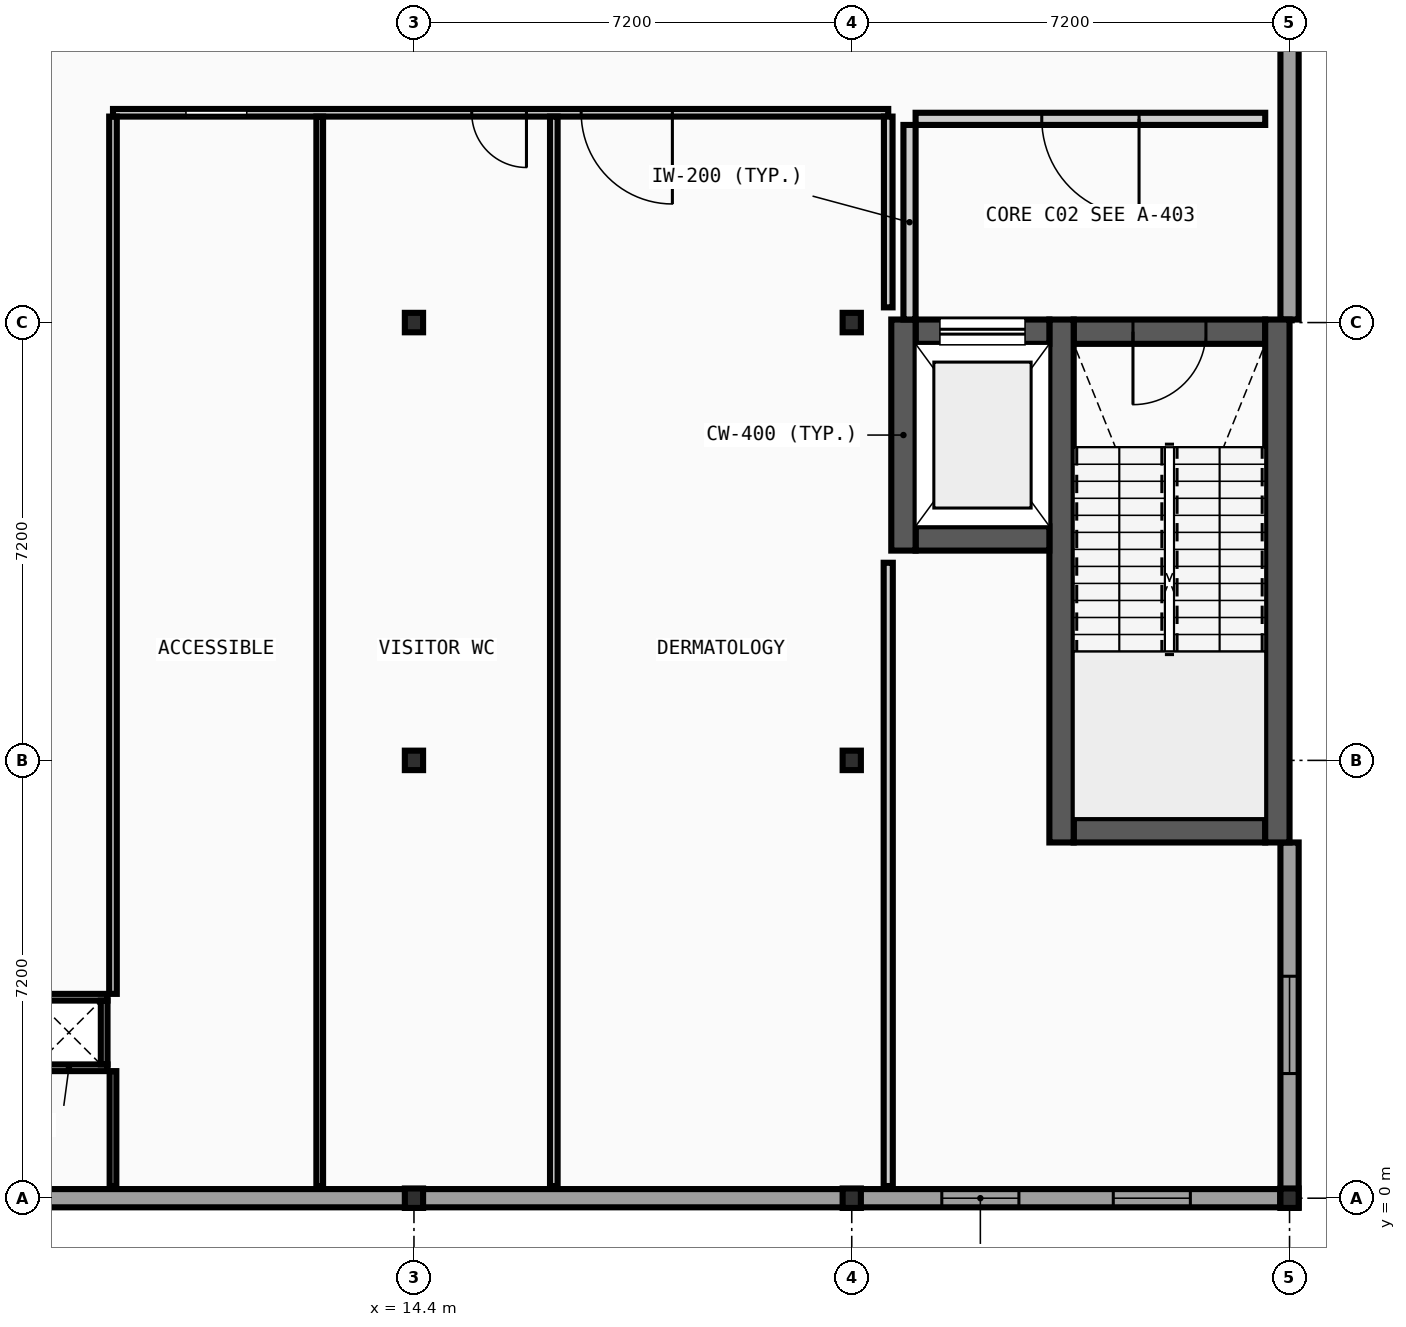
"""IFC4 building model, lengths in metres.
Left out: names, types, materials, properties, quantities, classifications, styles, units other than length and angle.
Written with IfcOpenShell. Run it as: python <this file> out.ifc"""

import sys

from ifc_helpers import new_model, si_unit, direction, frame, frame_2d, origin, origin_2d, place, context, subcontext, project, spatial, rectangle, i_section, extrude, element, fill, save


model = new_model("IFC4")
c1 = context("Model", 3, precision=1e-05, world=origin(), true_north=direction((0.0, 1.0)))
c2 = subcontext(c1, "Body", "Model", "MODEL_VIEW")
j1 = project(units=[si_unit("LENGTHUNIT", "METRE"), si_unit("PLANEANGLEUNIT", "RADIAN")], contexts=[c1])
p1 = place(None, origin())
s1 = spatial("IfcSite", under=j1, at=p1, CompositionType="ELEMENT")
p2 = place(p1, origin())
s2 = spatial("IfcBuilding", under=s1, at=p2, CompositionType="ELEMENT")
p3 = place(p2, frame((0.0, 0.0, 22.8)))
s3 = spatial("IfcBuildingStorey", under=s2, at=p3, CompositionType="ELEMENT", Elevation=22.8)
for number, where, z_axis, x_axis in (
    (1, (14.4, 0.0, 0.0), (0.0, 0.0, 1.0), (1.0, 0.0, 0.0)),
    (2, (14.4, 7.2, 0.0), (0.0, 0.0, 1.0), (1.0, 0.0, 0.0)),
    (3, (14.4, 14.4, 0.0), (0.0, 0.0, 1.0), (1.0, 0.0, 0.0)),
    (4, (21.6, 0.0, 0.0), (0.0, 0.0, 1.0), (1.0, 0.0, 0.0)),
    (5, (21.6, 7.2, 0.0), (0.0, 0.0, 1.0), (1.0, 0.0, 0.0)),
    (6, (21.6, 14.4, 0.0), (0.0, 0.0, 1.0), (1.0, 0.0, 0.0)),
    (7, (28.8, 0.0, 0.0), (0.0, 0.0, 1.0), (1.0, 0.0, 0.0)),
):
    element("IfcColumn", number, at=place(p3, frame(where, z_axis=z_axis, x_axis=x_axis)), inside=s3, PredefinedType="COLUMN", context=c2, shape_type="SweptSolid", body=[
        extrude(i_section(OverallWidth=0.3, OverallDepth=0.32, WebThickness=0.011, FlangeThickness=0.021, FilletRadius=0.027, at=origin_2d()), origin(), (0.0, 0.0, 1.0), 4.4),
    ])
p4 = place(p3, frame((7.2, 0.0, 0.0), z_axis=(0.0, 0.0, 1.0), x_axis=(1.0, 0.0, 0.0)))
e8 = element("IfcWall", 8, at=p4, inside=s3, PredefinedType="STANDARD", context=c2, shape_type="SweptSolid", body=[
    extrude(rectangle(XDim=7.2, YDim=0.3, at=frame_2d((3.6, 0.0))), origin(), (0.0, 0.0, 1.0), 3.95),
])
p5 = place(p3, frame((14.4, 0.0, 0.0), z_axis=(0.0, 0.0, 1.0), x_axis=(1.0, 0.0, 0.0)))
e9 = element("IfcWall", 9, at=p5, inside=s3, PredefinedType="STANDARD", context=c2, shape_type="SweptSolid", body=[
    extrude(rectangle(XDim=7.2, YDim=0.3, at=frame_2d((3.6, 0.0))), origin(), (0.0, 0.0, 1.0), 3.95),
])
p6 = place(p3, frame((21.6, 0.0, 0.0), z_axis=(0.0, 0.0, 1.0), x_axis=(1.0, 0.0, 0.0)))
e10 = element("IfcWall", 10, at=p6, inside=s3, PredefinedType="STANDARD", context=c2, shape_type="SweptSolid", body=[
    extrude(rectangle(XDim=7.05, YDim=0.3, at=frame_2d((3.525, 0.0))), origin(), (0.0, 0.0, 1.0), 3.95),
])
p7 = place(p6, frame((1.481, 0.0, 0.95)))
e11 = element("IfcOpeningElement", 11, at=p7, cuts=e10, PredefinedType="OPENING", context=c2, shape_type="SweptSolid", body=[
    extrude(rectangle(XDim=1.268, YDim=1.404, at=frame_2d((0.634, 0.702))), frame((0.0, 0.16, 0.0), z_axis=(0.0, -1.0, 0.0), x_axis=(1.0, 0.0, 0.0)), (0.0, 0.0, 1.0), 0.32),
])
p8 = place(p6, frame((4.301, 0.0, 0.95)))
e12 = element("IfcOpeningElement", 12, at=p8, cuts=e10, PredefinedType="OPENING", context=c2, shape_type="SweptSolid", body=[
    extrude(rectangle(XDim=1.268, YDim=1.404, at=frame_2d((0.634, 0.702))), frame((0.0, 0.16, 0.0), z_axis=(0.0, -1.0, 0.0), x_axis=(1.0, 0.0, 0.0)), (0.0, 0.0, 1.0), 0.32),
])
p9 = place(p3, frame((28.8, -0.15, 0.0), z_axis=(0.0, 0.0, 1.0), x_axis=(0.0, 1.0, 0.0)))
e13 = element("IfcWall", 13, at=p9, inside=s3, PredefinedType="STANDARD", context=c2, shape_type="SweptSolid", body=[
    extrude(rectangle(XDim=6.0, YDim=0.3, at=frame_2d((3.0, 0.0))), origin(), (0.0, 0.0, 1.0), 4.215),
])
p10 = place(p9, frame((2.2, 0.0, 1.2)))
e14 = element("IfcOpeningElement", 14, at=p10, cuts=e13, PredefinedType="OPENING", context=c2, shape_type="SweptSolid", body=[
    extrude(rectangle(XDim=1.6, YDim=1.4, at=frame_2d((0.8, 0.7))), frame((0.0, 0.16, 0.0), z_axis=(0.0, -1.0, 0.0), x_axis=(1.0, 0.0, 0.0)), (0.0, 0.0, 1.0), 0.32),
])
p11 = place(p3, frame((28.8, 14.45, 0.0), z_axis=(0.0, 0.0, 1.0), x_axis=(0.0, 1.0, 0.0)))
e15 = element("IfcWall", 15, at=p11, inside=s3, PredefinedType="STANDARD", context=c2, shape_type="SweptSolid", body=[
    extrude(rectangle(XDim=7.15, YDim=0.3, at=frame_2d((3.575, 0.0))), origin(), (0.0, 0.0, 1.0), 4.215),
])
p12 = place(p3, frame((25.25, 6.05, 0.0), z_axis=(0.0, 0.0, 1.0), x_axis=(1.0, 0.0, 0.0)))
e16 = element("IfcWall", 16, at=p12, inside=s3, PredefinedType="SHEAR", context=c2, shape_type="SweptSolid", body=[
    extrude(rectangle(XDim=3.15, YDim=0.4, at=frame_2d((1.575, 0.0))), origin(), (0.0, 0.0, 1.0), 4.215),
])
p13 = place(p3, frame((25.25, 14.25, 0.0), z_axis=(0.0, 0.0, 1.0), x_axis=(1.0, 0.0, 0.0)))
e17 = element("IfcWall", 17, at=p13, inside=s3, PredefinedType="SHEAR", context=c2, shape_type="SweptSolid", body=[
    extrude(rectangle(XDim=3.15, YDim=0.4, at=frame_2d((1.575, 0.0))), origin(), (0.0, 0.0, 1.0), 4.215),
])
p14 = place(p13, frame((0.975, 0.0, 0.0)))
e18 = element("IfcOpeningElement", 18, at=p14, cuts=e17, PredefinedType="OPENING", context=c2, shape_type="SweptSolid", body=[
    extrude(rectangle(XDim=1.2, YDim=2.15, at=frame_2d((0.6, 1.075))), frame((0.0, 0.21, 0.0), z_axis=(0.0, -1.0, 0.0), x_axis=(1.0, 0.0, 0.0)), (0.0, 0.0, 1.0), 0.42),
])
for number, where, z_axis, x_axis in (
    (19, (25.05, 5.85, 0.0), (0.0, 0.0, 1.0), (0.0, 1.0, 0.0)),
    (20, (28.6, 5.85, 0.0), (0.0, 0.0, 1.0), (0.0, 1.0, 0.0)),
):
    element("IfcWall", number, at=place(p3, frame(where, z_axis=z_axis, x_axis=x_axis)), inside=s3, PredefinedType="SHEAR", context=c2, shape_type="SweptSolid", body=[
        extrude(rectangle(XDim=8.6, YDim=0.4, at=frame_2d((4.3, 0.0))), origin(), (0.0, 0.0, 1.0), 4.215),
    ])
p15 = place(p3, frame((22.65, 10.85, 0.0), z_axis=(0.0, 0.0, 1.0), x_axis=(1.0, 0.0, 0.0)))
e21 = element("IfcWall", 21, at=p15, inside=s3, PredefinedType="SHEAR", context=c2, shape_type="SweptSolid", body=[
    extrude(rectangle(XDim=2.2, YDim=0.4, at=frame_2d((1.1, 0.0))), origin(), (0.0, 0.0, 1.0), 4.215),
])
p16 = place(p3, frame((22.65, 14.25, 0.0), z_axis=(0.0, 0.0, 1.0), x_axis=(1.0, 0.0, 0.0)))
e22 = element("IfcWall", 22, at=p16, inside=s3, PredefinedType="SHEAR", context=c2, shape_type="SweptSolid", body=[
    extrude(rectangle(XDim=2.2, YDim=0.4, at=frame_2d((1.1, 0.0))), origin(), (0.0, 0.0, 1.0), 4.215),
])
p17 = place(p16, frame((0.4, 0.0, 0.0)))
e23 = element("IfcOpeningElement", 23, at=p17, cuts=e22, PredefinedType="OPENING", context=c2, shape_type="SweptSolid", body=[
    extrude(rectangle(XDim=1.4, YDim=2.2, at=frame_2d((0.7, 1.1))), frame((0.0, 0.21, 0.0), z_axis=(0.0, -1.0, 0.0), x_axis=(1.0, 0.0, 0.0)), (0.0, 0.0, 1.0), 0.42),
])
p18 = place(p3, frame((22.45, 10.65, 0.0), z_axis=(0.0, 0.0, 1.0), x_axis=(0.0, 1.0, 0.0)))
e24 = element("IfcWall", 24, at=p18, inside=s3, PredefinedType="SHEAR", context=c2, shape_type="SweptSolid", body=[
    extrude(rectangle(XDim=3.8, YDim=0.4, at=frame_2d((1.9, 0.0))), origin(), (0.0, 0.0, 1.0), 4.215),
])
p19 = place(p3, frame((22.65, 17.75, 0.0), z_axis=(0.0, 0.0, 1.0), x_axis=(1.0, 0.0, 0.0)))
e25 = element("IfcWall", 25, at=p19, inside=s3, PredefinedType="PARTITIONING", context=c2, shape_type="SweptSolid", body=[
    extrude(rectangle(XDim=5.75, YDim=0.2, at=frame_2d((2.875, 0.0))), origin(), (0.0, 0.0, 1.0), 4.215),
])
p20 = place(p19, frame((2.075, 0.0, 0.0)))
e26 = element("IfcOpeningElement", 26, at=p20, cuts=e25, PredefinedType="OPENING", context=c2, shape_type="SweptSolid", body=[
    extrude(rectangle(XDim=1.6, YDim=2.2, at=frame_2d((0.8, 1.1))), frame((0.0, 0.11, 0.0), z_axis=(0.0, -1.0, 0.0), x_axis=(1.0, 0.0, 0.0)), (0.0, 0.0, 1.0), 0.22),
])
p21 = place(p3, frame((22.55, 14.45, 0.0), z_axis=(0.0, 0.0, 1.0), x_axis=(0.0, 1.0, 0.0)))
e27 = element("IfcWall", 27, at=p21, inside=s3, PredefinedType="PARTITIONING", context=c2, shape_type="SweptSolid", body=[
    extrude(rectangle(XDim=3.2, YDim=0.2, at=frame_2d((1.6, 0.0))), origin(), (0.0, 0.0, 1.0), 4.215),
])
for number, where, z_axis, x_axis in (
    (28, (8.09, 2.145, 0.0), (0.0, 0.0, 1.0), (1.0, 0.0, 0.0)),
    (29, (8.09, 3.305, 0.0), (0.0, 0.0, 1.0), (1.0, 0.0, 0.0)),
):
    element("IfcWall", number, at=place(p3, frame(where, z_axis=z_axis, x_axis=x_axis)), inside=s3, PredefinedType="PARTITIONING", context=c2, shape_type="SweptSolid", body=[
        extrude(rectangle(XDim=1.27, YDim=0.11, at=frame_2d((0.635, 0.0))), origin(), (0.0, 0.0, 1.0), 4.215),
    ])
p22 = place(p3, frame((9.305, 2.2, 0.0), z_axis=(0.0, 0.0, 1.0), x_axis=(0.0, 1.0, 0.0)))
e30 = element("IfcWall", 30, at=p22, inside=s3, PredefinedType="PARTITIONING", context=c2, shape_type="SweptSolid", body=[
    extrude(rectangle(XDim=1.05, YDim=0.11, at=frame_2d((0.525, 0.0))), origin(), (0.0, 0.0, 1.0), 4.215),
])
p23 = place(p3, frame((9.45, 17.85, 0.0), z_axis=(0.0, 0.0, 1.0), x_axis=(1.0, 0.0, 0.0)))
e31 = element("IfcWall", 31, at=p23, inside=s3, PredefinedType="PARTITIONING", context=c2, shape_type="SweptSolid", body=[
    extrude(rectangle(XDim=12.75, YDim=0.125, at=frame_2d((6.375, 0.0))), origin(), (0.0, 0.0, 1.0), 4.215),
])
p24 = place(p23, frame((1.2, 0.0, 0.0)))
e32 = element("IfcOpeningElement", 32, at=p24, cuts=e31, PredefinedType="OPENING", context=c2, shape_type="SweptSolid", body=[
    extrude(rectangle(XDim=1.0, YDim=2.1, at=frame_2d((0.5, 1.05))), frame((0.0, 0.073, 0.0), z_axis=(0.0, -1.0, 0.0), x_axis=(1.0, 0.0, 0.0)), (0.0, 0.0, 1.0), 0.145),
])
p25 = place(p23, frame((5.9, 0.0, 0.0)))
e33 = element("IfcOpeningElement", 33, at=p25, cuts=e31, PredefinedType="OPENING", context=c2, shape_type="SweptSolid", body=[
    extrude(rectangle(XDim=0.9, YDim=2.1, at=frame_2d((0.45, 1.05))), frame((0.0, 0.073, 0.0), z_axis=(0.0, -1.0, 0.0), x_axis=(1.0, 0.0, 0.0)), (0.0, 0.0, 1.0), 0.145),
])
p26 = place(p23, frame((7.7, 0.0, 0.0)))
e34 = element("IfcOpeningElement", 34, at=p26, cuts=e31, PredefinedType="OPENING", context=c2, shape_type="SweptSolid", body=[
    extrude(rectangle(XDim=1.5, YDim=2.2, at=frame_2d((0.75, 1.1))), frame((0.0, 0.073, 0.0), z_axis=(0.0, -1.0, 0.0), x_axis=(1.0, 0.0, 0.0)), (0.0, 0.0, 1.0), 0.145),
])
p27 = place(p3, frame((9.45, 0.2, 0.0), z_axis=(0.0, 0.0, 1.0), x_axis=(0.0, 1.0, 0.0)))
e35 = element("IfcWall", 35, at=p27, inside=s3, PredefinedType="PARTITIONING", context=c2, shape_type="SweptSolid", body=[
    extrude(rectangle(XDim=1.89, YDim=0.11, at=frame_2d((0.945, 0.0))), origin(), (0.0, 0.0, 1.0), 4.0),
])
p28 = place(p3, frame((9.45, 3.36, 0.0), z_axis=(0.0, 0.0, 1.0), x_axis=(0.0, 1.0, 0.0)))
e36 = element("IfcWall", 36, at=p28, inside=s3, PredefinedType="PARTITIONING", context=c2, shape_type="SweptSolid", body=[
    extrude(rectangle(XDim=14.427, YDim=0.125, at=frame_2d((7.214, 0.0))), origin(), (0.0, 0.0, 1.0), 4.0),
])
p29 = place(p3, frame((12.85, 0.2, 0.0), z_axis=(0.0, 0.0, 1.0), x_axis=(0.0, 1.0, 0.0)))
e37 = element("IfcWall", 37, at=p29, inside=s3, PredefinedType="PARTITIONING", context=c2, shape_type="SweptSolid", body=[
    extrude(rectangle(XDim=17.588, YDim=0.11, at=frame_2d((8.794, 0.0))), origin(), (0.0, 0.0, 1.0), 4.215),
])
p30 = place(p3, frame((16.7, 0.2, 0.0), z_axis=(0.0, 0.0, 1.0), x_axis=(0.0, 1.0, 0.0)))
e38 = element("IfcWall", 38, at=p30, inside=s3, PredefinedType="PARTITIONING", context=c2, shape_type="SweptSolid", body=[
    extrude(rectangle(XDim=17.588, YDim=0.125, at=frame_2d((8.794, 0.0))), origin(), (0.0, 0.0, 1.0), 4.0),
])
p31 = place(p3, frame((22.2, 0.2, 0.0), z_axis=(0.0, 0.0, 1.0), x_axis=(0.0, 1.0, 0.0)))
e39 = element("IfcWall", 39, at=p31, inside=s3, PredefinedType="PARTITIONING", context=c2, shape_type="SweptSolid", body=[
    extrude(rectangle(XDim=10.25, YDim=0.15, at=frame_2d((5.125, 0.0))), origin(), (0.0, 0.0, 1.0), 4.215),
])
p32 = place(p3, frame((22.2, 14.65, 0.0), z_axis=(0.0, 0.0, 1.0), x_axis=(0.0, 1.0, 0.0)))
e40 = element("IfcWall", 40, at=p32, inside=s3, PredefinedType="PARTITIONING", context=c2, shape_type="SweptSolid", body=[
    extrude(rectangle(XDim=3.138, YDim=0.142, at=frame_2d((1.569, 0.0))), origin(), (0.0, 0.0, 1.0), 4.215),
])
p33 = place(p7, origin())
e41 = element("IfcWindow", 41, at=p33, inside=s3, PartitioningType="SINGLE_PANEL", PredefinedType="WINDOW", context=c2, shape_type="SweptSolid", body=[
    extrude(rectangle(XDim=1.268, YDim=1.404, at=frame_2d((0.634, 0.702))), frame((0.0, 0.03, 0.0), z_axis=(0.0, -1.0, 0.0), x_axis=(1.0, 0.0, 0.0)), (0.0, 0.0, 1.0), 0.06),
])
fill(e11, e41)
p34 = place(p8, origin())
e42 = element("IfcWindow", 42, at=p34, inside=s3, PartitioningType="SINGLE_PANEL", PredefinedType="WINDOW", context=c2, shape_type="SweptSolid", body=[
    extrude(rectangle(XDim=1.268, YDim=1.404, at=frame_2d((0.634, 0.702))), frame((0.0, 0.03, 0.0), z_axis=(0.0, -1.0, 0.0), x_axis=(1.0, 0.0, 0.0)), (0.0, 0.0, 1.0), 0.06),
])
fill(e12, e42)
p35 = place(p10, origin())
e43 = element("IfcWindow", 43, at=p35, inside=s3, PartitioningType="SINGLE_PANEL", PredefinedType="WINDOW", context=c2, shape_type="SweptSolid", body=[
    extrude(rectangle(XDim=1.6, YDim=1.4, at=frame_2d((0.8, 0.7))), frame((0.0, 0.03, 0.0), z_axis=(0.0, -1.0, 0.0), x_axis=(1.0, 0.0, 0.0)), (0.0, 0.0, 1.0), 0.06),
])
fill(e14, e43)
p36 = place(p14, frame((1.2, 0.0, 0.0), z_axis=(0.0, 0.0, 1.0), x_axis=(-1.0, 0.0, 0.0)))
e44 = element("IfcDoor", 44, at=p36, inside=s3, OperationType="SINGLE_SWING_LEFT", PredefinedType="DOOR", context=c2, shape_type="SweptSolid", body=[
    extrude(rectangle(XDim=1.2, YDim=2.15, at=frame_2d((0.6, 1.075))), frame((0.0, 0.025, 0.0), z_axis=(0.0, -1.0, 0.0), x_axis=(1.0, 0.0, 0.0)), (0.0, 0.0, 1.0), 0.05),
])
fill(e18, e44)
p37 = place(p17, origin())
e45 = element("IfcDoor", 45, at=p37, inside=s3, OperationType="SLIDING_TO_LEFT", PredefinedType="DOOR", context=c2, shape_type="SweptSolid", body=[
    extrude(rectangle(XDim=1.4, YDim=2.2, at=frame_2d((0.7, 1.1))), frame((0.0, 0.025, 0.0), z_axis=(0.0, -1.0, 0.0), x_axis=(1.0, 0.0, 0.0)), (0.0, 0.0, 1.0), 0.05),
])
fill(e23, e45)
p38 = place(p20, origin())
e46 = element("IfcDoor", 46, at=p38, inside=s3, OperationType="DOUBLE_DOOR_SINGLE_SWING", PredefinedType="DOOR", context=c2, shape_type="SweptSolid", body=[
    extrude(rectangle(XDim=1.6, YDim=2.2, at=frame_2d((0.8, 1.1))), frame((0.0, 0.025, 0.0), z_axis=(0.0, -1.0, 0.0), x_axis=(1.0, 0.0, 0.0)), (0.0, 0.0, 1.0), 0.05),
])
fill(e26, e46)
p39 = place(p24, origin())
e47 = element("IfcDoor", 47, at=p39, inside=s3, OperationType="SLIDING_TO_LEFT", PredefinedType="DOOR", context=c2, shape_type="SweptSolid", body=[
    extrude(rectangle(XDim=1.0, YDim=2.1, at=frame_2d((0.5, 1.05))), frame((0.0, 0.025, 0.0), z_axis=(0.0, -1.0, 0.0), x_axis=(1.0, 0.0, 0.0)), (0.0, 0.0, 1.0), 0.05),
])
fill(e32, e47)
p40 = place(p25, origin())
e48 = element("IfcDoor", 48, at=p40, inside=s3, OperationType="SINGLE_SWING_RIGHT", PredefinedType="DOOR", context=c2, shape_type="SweptSolid", body=[
    extrude(rectangle(XDim=0.9, YDim=2.1, at=frame_2d((0.45, 1.05))), frame((0.0, 0.025, 0.0), z_axis=(0.0, -1.0, 0.0), x_axis=(1.0, 0.0, 0.0)), (0.0, 0.0, 1.0), 0.05),
])
fill(e33, e48)
p41 = place(p26, origin())
e49 = element("IfcDoor", 49, at=p41, inside=s3, OperationType="DOUBLE_DOOR_SINGLE_SWING", PredefinedType="DOOR", context=c2, shape_type="SweptSolid", body=[
    extrude(rectangle(XDim=1.5, YDim=2.2, at=frame_2d((0.75, 1.1))), frame((0.0, 0.025, 0.0), z_axis=(0.0, -1.0, 0.0), x_axis=(1.0, 0.0, 0.0)), (0.0, 0.0, 1.0), 0.05),
])
fill(e34, e49)
save(model, sys.argv[1])
